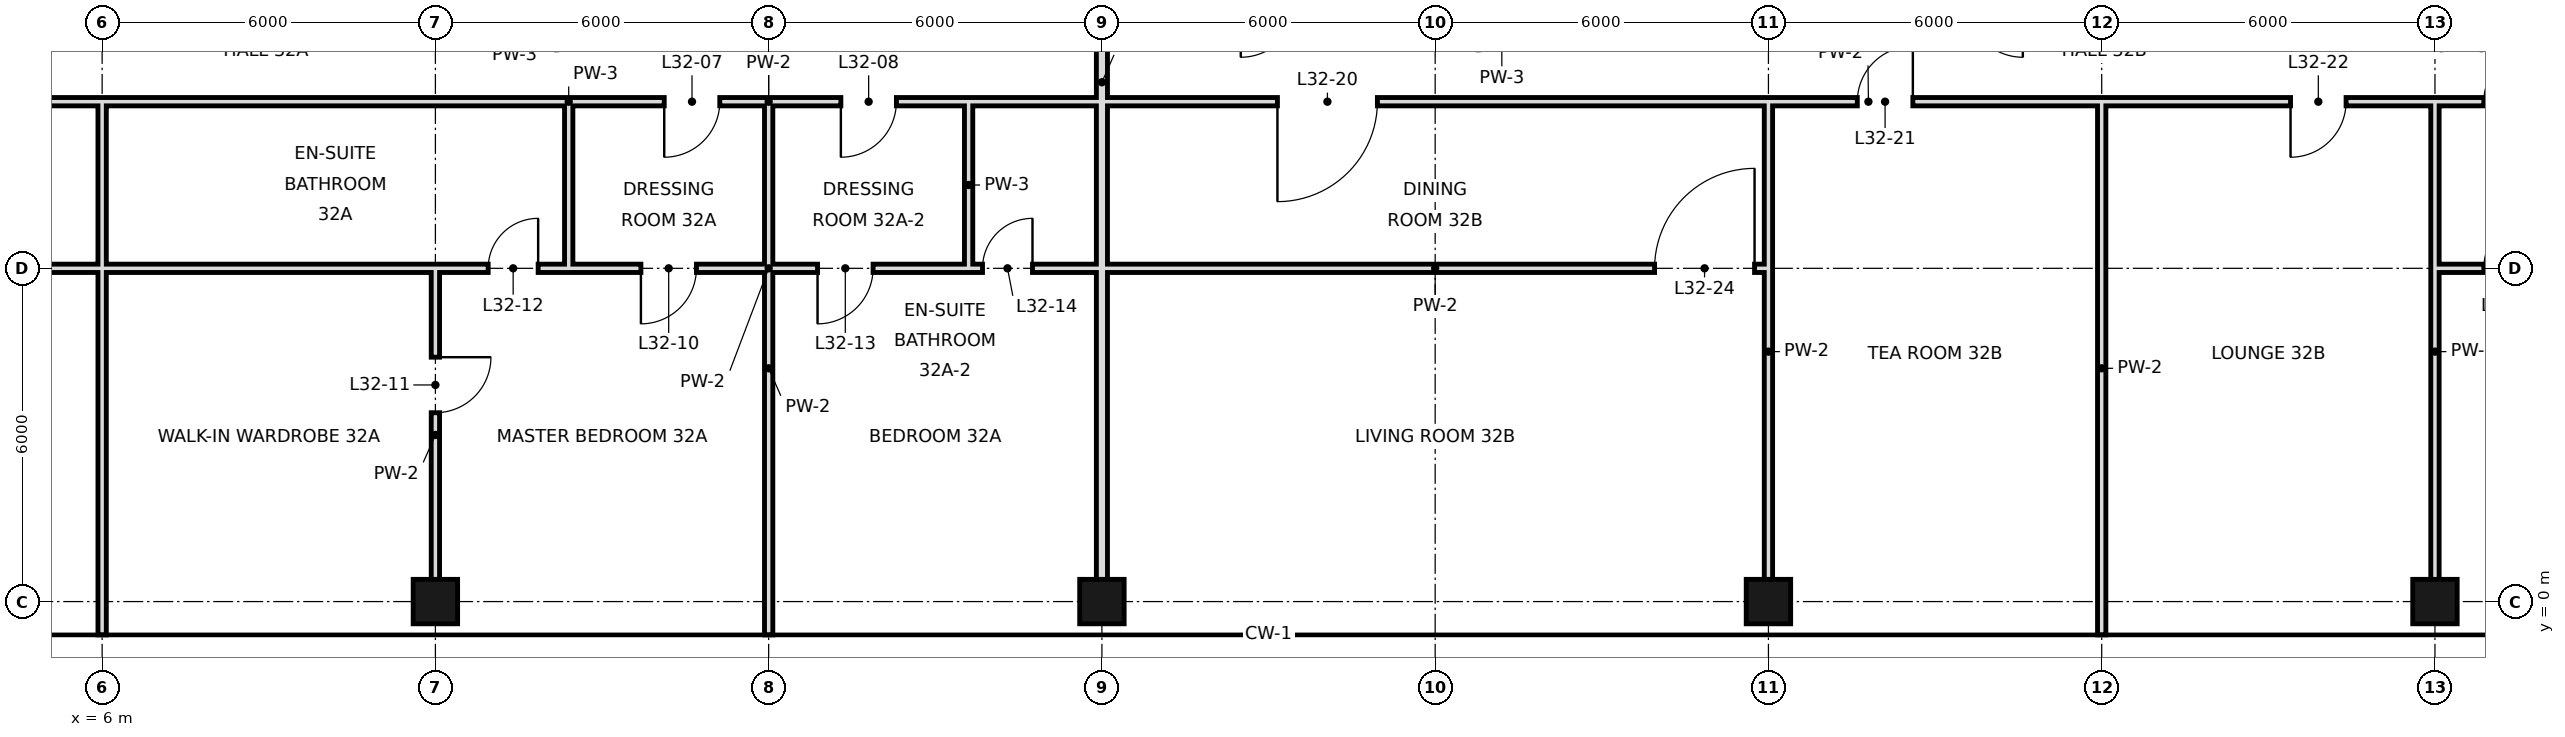
"""IFC4 building model, lengths in metres.
Left out: names, types, materials, properties, quantities, classifications, styles, units other than length and angle.
Written with IfcOpenShell. Run it as: python <this file> out.ifc"""

import sys

from ifc_helpers import new_model, si_unit, direction, frame, frame_2d, origin, origin_2d, place, context, subcontext, project, spatial, rectangle, hollow_rectangle, extrude, element, fill, save


model = new_model("IFC4")
c1 = context("Model", 3, precision=1e-05, world=origin(), true_north=direction((0.0, 1.0)))
c2 = subcontext(c1, "Body", "Model", "MODEL_VIEW")
j1 = project(units=[si_unit("LENGTHUNIT", "METRE"), si_unit("PLANEANGLEUNIT", "RADIAN")], contexts=[c1])
p1 = place(None, origin())
s1 = spatial("IfcSite", under=j1, at=p1, CompositionType="ELEMENT")
p2 = place(p1, origin())
s2 = spatial("IfcBuilding", under=s1, at=p2, CompositionType="ELEMENT")
p3 = place(p2, frame((0.0, 0.0, 143.8)))
s3 = spatial("IfcBuildingStorey", under=s2, at=p3, CompositionType="ELEMENT", Elevation=143.8)
for number, where, z_axis, x_axis in (
    (1, (12.0, 0.0, 0.0), (0.0, 0.0, 1.0), (1.0, 0.0, 0.0)),
    (2, (24.0, 0.0, 0.0), (0.0, 0.0, 1.0), (1.0, 0.0, 0.0)),
    (3, (36.0, 0.0, 0.0), (0.0, 0.0, 1.0), (1.0, 0.0, 0.0)),
    (4, (48.0, 0.0, 0.0), (0.0, 0.0, 1.0), (1.0, 0.0, 0.0)),
):
    element("IfcColumn", number, at=place(p3, frame(where, z_axis=z_axis, x_axis=x_axis)), inside=s3, PredefinedType="COLUMN", context=c2, shape_type="SweptSolid", body=[
        extrude(hollow_rectangle(XDim=0.8, YDim=0.8, WallThickness=0.04, at=origin_2d()), origin(), (0.0, 0.0, 1.0), 3.6),
    ])
p4 = place(p3, frame((12.0, 0.0, 0.0), z_axis=(0.0, 0.0, 1.0), x_axis=(0.0, 1.0, 0.0)))
e5 = element("IfcWall", 5, at=p4, inside=s3, PredefinedType="PARTITIONING", context=c2, shape_type="SweptSolid", body=[
    extrude(rectangle(XDim=6.0, YDim=0.15, at=frame_2d((3.0, 0.0))), origin(), (0.0, 0.0, 1.0), 2.72),
])
p5 = place(p4, frame((3.4, 0.0, 0.0)))
e6 = element("IfcOpeningElement", 6, at=p5, cuts=e5, PredefinedType="OPENING", context=c2, shape_type="SweptSolid", body=[
    extrude(rectangle(XDim=1.0, YDim=2.4, at=frame_2d((0.5, 1.2))), frame((0.0, 0.085, 0.0), z_axis=(0.0, -1.0, 0.0), x_axis=(1.0, 0.0, 0.0)), (0.0, 0.0, 1.0), 0.17),
])
p6 = place(p3, frame((14.4, 6.0, 0.0), z_axis=(0.0, 0.0, 1.0), x_axis=(0.0, 1.0, 0.0)))
e7 = element("IfcWall", 7, at=p6, inside=s3, PredefinedType="PARTITIONING", context=c2, shape_type="SweptSolid", body=[
    extrude(rectangle(XDim=3.0, YDim=0.15, at=frame_2d((1.5, 0.0))), origin(), (0.0, 0.0, 1.0), 3.42),
])
p7 = place(p3, frame((18.0, -0.6, 0.0), z_axis=(0.0, 0.0, 1.0), x_axis=(0.0, 1.0, 0.0)))
e8 = element("IfcWall", 8, at=p7, inside=s3, PredefinedType="PARTITIONING", context=c2, shape_type="SweptSolid", body=[
    extrude(rectangle(XDim=9.6, YDim=0.15, at=frame_2d((4.8, 0.0))), origin(), (0.0, 0.0, 1.0), 2.72),
])
p8 = place(p3, frame((21.6, 6.0, 0.0), z_axis=(0.0, 0.0, 1.0), x_axis=(0.0, 1.0, 0.0)))
e9 = element("IfcWall", 9, at=p8, inside=s3, PredefinedType="PARTITIONING", context=c2, shape_type="SweptSolid", body=[
    extrude(rectangle(XDim=3.0, YDim=0.15, at=frame_2d((1.5, 0.0))), origin(), (0.0, 0.0, 1.0), 3.42),
])
p9 = place(p3, frame((24.0, 0.0, 0.0), z_axis=(0.0, 0.0, 1.0), x_axis=(0.0, 1.0, 0.0)))
e10 = element("IfcWall", 10, at=p9, inside=s3, PredefinedType="SOLIDWALL", context=c2, shape_type="SweptSolid", body=[
    extrude(rectangle(XDim=18.7, YDim=0.2, at=frame_2d((9.35, 0.0))), origin(), (0.0, 0.0, 1.0), 2.72),
])
p10 = place(p3, frame((36.0, 0.0, 0.0), z_axis=(0.0, 0.0, 1.0), x_axis=(0.0, 1.0, 0.0)))
e11 = element("IfcWall", 11, at=p10, inside=s3, PredefinedType="PARTITIONING", context=c2, shape_type="SweptSolid", body=[
    extrude(rectangle(XDim=9.0, YDim=0.15, at=frame_2d((4.5, 0.0))), origin(), (0.0, 0.0, 1.0), 2.72),
])
p11 = place(p3, frame((42.0, -0.6, 0.0), z_axis=(0.0, 0.0, 1.0), x_axis=(0.0, 1.0, 0.0)))
e12 = element("IfcWall", 12, at=p11, inside=s3, PredefinedType="PARTITIONING", context=c2, shape_type="SweptSolid", body=[
    extrude(rectangle(XDim=9.6, YDim=0.15, at=frame_2d((4.8, 0.0))), origin(), (0.0, 0.0, 1.0), 2.72),
])
p12 = place(p3, frame((48.0, 0.0, 0.0), z_axis=(0.0, 0.0, 1.0), x_axis=(0.0, 1.0, 0.0)))
e13 = element("IfcWall", 13, at=p12, inside=s3, PredefinedType="PARTITIONING", context=c2, shape_type="SweptSolid", body=[
    extrude(rectangle(XDim=9.0, YDim=0.15, at=frame_2d((4.5, 0.0))), origin(), (0.0, 0.0, 1.0), 2.72),
])
p13 = place(p3, frame((6.0, -0.6, 0.0), z_axis=(0.0, 0.0, 1.0), x_axis=(0.0, 1.0, 0.0)))
e14 = element("IfcWall", 14, at=p13, inside=s3, PredefinedType="PARTITIONING", context=c2, shape_type="SweptSolid", body=[
    extrude(rectangle(XDim=6.6, YDim=0.15, at=frame_2d((3.3, 0.0))), origin(), (0.0, 0.0, 1.0), 2.72),
])
p14 = place(p3, frame((6.0, 6.0, 0.0), z_axis=(0.0, 0.0, 1.0), x_axis=(0.0, 1.0, 0.0)))
e15 = element("IfcWall", 15, at=p14, inside=s3, PredefinedType="PARTITIONING", context=c2, shape_type="SweptSolid", body=[
    extrude(rectangle(XDim=3.0, YDim=0.15, at=frame_2d((1.5, 0.0))), origin(), (0.0, 0.0, 1.0), 2.72),
])
p15 = place(p3, frame((-6.0, 6.0, 0.0), z_axis=(0.0, 0.0, 1.0), x_axis=(1.0, 0.0, 0.0)))
e16 = element("IfcWall", 16, at=p15, inside=s3, PredefinedType="PARTITIONING", context=c2, shape_type="SweptSolid", body=[
    extrude(rectangle(XDim=12.0, YDim=0.15, at=frame_2d((6.0, 0.0))), origin(), (0.0, 0.0, 1.0), 2.97),
])
p16 = place(p15, frame((7.04, 0.0, 0.0)))
e17 = element("IfcOpeningElement", 17, at=p16, cuts=e16, PredefinedType="OPENING", context=c2, shape_type="SweptSolid", body=[
    extrude(rectangle(XDim=1.8, YDim=2.4, at=frame_2d((0.9, 1.2))), frame((0.0, 0.085, 0.0), z_axis=(0.0, -1.0, 0.0), x_axis=(1.0, 0.0, 0.0)), (0.0, 0.0, 1.0), 0.17),
])
p17 = place(p3, frame((14.4, 6.0, 0.0), z_axis=(0.0, 0.0, 1.0), x_axis=(1.0, 0.0, 0.0)))
e18 = element("IfcWall", 18, at=p17, inside=s3, PredefinedType="PARTITIONING", context=c2, shape_type="SweptSolid", body=[
    extrude(rectangle(XDim=7.2, YDim=0.15, at=frame_2d((3.6, 0.0))), origin(), (0.0, 0.0, 1.0), 2.97),
])
p18 = place(p17, frame((1.3, 0.0, 0.0)))
e19 = element("IfcOpeningElement", 19, at=p18, cuts=e18, PredefinedType="OPENING", context=c2, shape_type="SweptSolid", body=[
    extrude(rectangle(XDim=1.0, YDim=2.4, at=frame_2d((0.5, 1.2))), frame((0.0, 0.085, 0.0), z_axis=(0.0, -1.0, 0.0), x_axis=(1.0, 0.0, 0.0)), (0.0, 0.0, 1.0), 0.17),
])
p19 = place(p17, frame((4.48, 0.0, 0.0)))
e20 = element("IfcOpeningElement", 20, at=p19, cuts=e18, PredefinedType="OPENING", context=c2, shape_type="SweptSolid", body=[
    extrude(rectangle(XDim=1.0, YDim=2.4, at=frame_2d((0.5, 1.2))), frame((0.0, 0.085, 0.0), z_axis=(0.0, -1.0, 0.0), x_axis=(1.0, 0.0, 0.0)), (0.0, 0.0, 1.0), 0.17),
])
p20 = place(p3, frame((24.0, 6.0, 0.0), z_axis=(0.0, 0.0, 1.0), x_axis=(1.0, 0.0, 0.0)))
e21 = element("IfcWall", 21, at=p20, inside=s3, PredefinedType="PARTITIONING", context=c2, shape_type="SweptSolid", body=[
    extrude(rectangle(XDim=12.0, YDim=0.15, at=frame_2d((6.0, 0.0))), origin(), (0.0, 0.0, 1.0), 2.97),
])
p21 = place(p20, frame((9.95, 0.0, 0.0)))
e22 = element("IfcOpeningElement", 22, at=p21, cuts=e21, PredefinedType="OPENING", context=c2, shape_type="SweptSolid", body=[
    extrude(rectangle(XDim=1.8, YDim=2.4, at=frame_2d((0.9, 1.2))), frame((0.0, 0.085, 0.0), z_axis=(0.0, -1.0, 0.0), x_axis=(1.0, 0.0, 0.0)), (0.0, 0.0, 1.0), 0.17),
])
p22 = place(p3, frame((48.0, 6.0, 0.0), z_axis=(0.0, 0.0, 1.0), x_axis=(1.0, 0.0, 0.0)))
e23 = element("IfcWall", 23, at=p22, inside=s3, PredefinedType="PARTITIONING", context=c2, shape_type="SweptSolid", body=[
    extrude(rectangle(XDim=3.6, YDim=0.15, at=frame_2d((1.8, 0.0))), origin(), (0.0, 0.0, 1.0), 2.72),
])
p23 = place(p22, frame((0.88, 0.0, 0.0)))
e24 = element("IfcOpeningElement", 24, at=p23, cuts=e23, PredefinedType="OPENING", context=c2, shape_type="SweptSolid", body=[
    extrude(rectangle(XDim=1.0, YDim=2.4, at=frame_2d((0.5, 1.2))), frame((0.0, 0.085, 0.0), z_axis=(0.0, -1.0, 0.0), x_axis=(1.0, 0.0, 0.0)), (0.0, 0.0, 1.0), 0.17),
])
p24 = place(p3, frame((6.0, 6.0, 0.0), z_axis=(0.0, 0.0, 1.0), x_axis=(1.0, 0.0, 0.0)))
e25 = element("IfcWall", 25, at=p24, inside=s3, PredefinedType="PARTITIONING", context=c2, shape_type="SweptSolid", body=[
    extrude(rectangle(XDim=8.4, YDim=0.15, at=frame_2d((4.2, 0.0))), origin(), (0.0, 0.0, 1.0), 2.97),
])
p25 = place(p24, frame((6.95, 0.0, 0.0)))
e26 = element("IfcOpeningElement", 26, at=p25, cuts=e25, PredefinedType="OPENING", context=c2, shape_type="SweptSolid", body=[
    extrude(rectangle(XDim=0.9, YDim=2.4, at=frame_2d((0.45, 1.2))), frame((0.0, 0.085, 0.0), z_axis=(0.0, -1.0, 0.0), x_axis=(1.0, 0.0, 0.0)), (0.0, 0.0, 1.0), 0.17),
])
p26 = place(p3, frame((21.6, 6.0, 0.0), z_axis=(0.0, 0.0, 1.0), x_axis=(1.0, 0.0, 0.0)))
e27 = element("IfcWall", 27, at=p26, inside=s3, PredefinedType="PARTITIONING", context=c2, shape_type="SweptSolid", body=[
    extrude(rectangle(XDim=2.4, YDim=0.15, at=frame_2d((1.2, 0.0))), origin(), (0.0, 0.0, 1.0), 2.97),
])
p27 = place(p26, frame((0.25, 0.0, 0.0)))
e28 = element("IfcOpeningElement", 28, at=p27, cuts=e27, PredefinedType="OPENING", context=c2, shape_type="SweptSolid", body=[
    extrude(rectangle(XDim=0.9, YDim=2.4, at=frame_2d((0.45, 1.2))), frame((0.0, 0.085, 0.0), z_axis=(0.0, -1.0, 0.0), x_axis=(1.0, 0.0, 0.0)), (0.0, 0.0, 1.0), 0.17),
])
p28 = place(p3, frame((-6.6, 9.0, 0.0), z_axis=(0.0, 0.0, 1.0), x_axis=(1.0, 0.0, 0.0)))
e29 = element("IfcWall", 29, at=p28, inside=s3, PredefinedType="PARTITIONING", context=c2, shape_type="SweptSolid", body=[
    extrude(rectangle(XDim=12.6, YDim=0.15, at=frame_2d((6.3, 0.0))), origin(), (0.0, 0.0, 1.0), 3.42),
])
p29 = place(p28, frame((7.64, 0.0, 0.0)))
e30 = element("IfcOpeningElement", 30, at=p29, cuts=e29, PredefinedType="OPENING", context=c2, shape_type="SweptSolid", body=[
    extrude(rectangle(XDim=1.8, YDim=2.4, at=frame_2d((0.9, 1.2))), frame((0.0, 0.085, 0.0), z_axis=(0.0, -1.0, 0.0), x_axis=(1.0, 0.0, 0.0)), (0.0, 0.0, 1.0), 0.17),
])
p30 = place(p3, frame((14.4, 9.0, 0.0), z_axis=(0.0, 0.0, 1.0), x_axis=(1.0, 0.0, 0.0)))
e31 = element("IfcWall", 31, at=p30, inside=s3, PredefinedType="PARTITIONING", context=c2, shape_type="SweptSolid", body=[
    extrude(rectangle(XDim=7.2, YDim=0.15, at=frame_2d((3.6, 0.0))), origin(), (0.0, 0.0, 1.0), 3.42),
])
p31 = place(p30, frame((1.72, 0.0, 0.0)))
e32 = element("IfcOpeningElement", 32, at=p31, cuts=e31, PredefinedType="OPENING", context=c2, shape_type="SweptSolid", body=[
    extrude(rectangle(XDim=1.0, YDim=2.4, at=frame_2d((0.5, 1.2))), frame((0.0, 0.085, 0.0), z_axis=(0.0, -1.0, 0.0), x_axis=(1.0, 0.0, 0.0)), (0.0, 0.0, 1.0), 0.17),
])
p32 = place(p30, frame((4.9, 0.0, 0.0)))
e33 = element("IfcOpeningElement", 33, at=p32, cuts=e31, PredefinedType="OPENING", context=c2, shape_type="SweptSolid", body=[
    extrude(rectangle(XDim=1.0, YDim=2.4, at=frame_2d((0.5, 1.2))), frame((0.0, 0.085, 0.0), z_axis=(0.0, -1.0, 0.0), x_axis=(1.0, 0.0, 0.0)), (0.0, 0.0, 1.0), 0.17),
])
p33 = place(p3, frame((24.0, 9.0, 0.0), z_axis=(0.0, 0.0, 1.0), x_axis=(1.0, 0.0, 0.0)))
e34 = element("IfcWall", 34, at=p33, inside=s3, PredefinedType="PARTITIONING", context=c2, shape_type="SweptSolid", body=[
    extrude(rectangle(XDim=27.6, YDim=0.15, at=frame_2d((13.8, 0.0))), origin(), (0.0, 0.0, 1.0), 3.42),
])
p34 = place(p33, frame((3.16, 0.0, 0.0)))
e35 = element("IfcOpeningElement", 35, at=p34, cuts=e34, PredefinedType="OPENING", context=c2, shape_type="SweptSolid", body=[
    extrude(rectangle(XDim=1.8, YDim=2.4, at=frame_2d((0.9, 1.2))), frame((0.0, 0.085, 0.0), z_axis=(0.0, -1.0, 0.0), x_axis=(1.0, 0.0, 0.0)), (0.0, 0.0, 1.0), 0.17),
])
p35 = place(p33, frame((13.6, 0.0, 0.0)))
e36 = element("IfcOpeningElement", 36, at=p35, cuts=e34, PredefinedType="OPENING", context=c2, shape_type="SweptSolid", body=[
    extrude(rectangle(XDim=1.0, YDim=2.4, at=frame_2d((0.5, 1.2))), frame((0.0, 0.085, 0.0), z_axis=(0.0, -1.0, 0.0), x_axis=(1.0, 0.0, 0.0)), (0.0, 0.0, 1.0), 0.17),
])
p36 = place(p33, frame((21.4, 0.0, 0.0)))
e37 = element("IfcOpeningElement", 37, at=p36, cuts=e34, PredefinedType="OPENING", context=c2, shape_type="SweptSolid", body=[
    extrude(rectangle(XDim=1.0, YDim=2.4, at=frame_2d((0.5, 1.2))), frame((0.0, 0.085, 0.0), z_axis=(0.0, -1.0, 0.0), x_axis=(1.0, 0.0, 0.0)), (0.0, 0.0, 1.0), 0.17),
])
p37 = place(p33, frame((24.88, 0.0, 0.0)))
e38 = element("IfcOpeningElement", 38, at=p37, cuts=e34, PredefinedType="OPENING", context=c2, shape_type="SweptSolid", body=[
    extrude(rectangle(XDim=1.0, YDim=2.4, at=frame_2d((0.5, 1.2))), frame((0.0, 0.085, 0.0), z_axis=(0.0, -1.0, 0.0), x_axis=(1.0, 0.0, 0.0)), (0.0, 0.0, 1.0), 0.17),
])
p38 = place(p3, frame((6.0, 9.0, 0.0), z_axis=(0.0, 0.0, 1.0), x_axis=(1.0, 0.0, 0.0)))
e39 = element("IfcWall", 39, at=p38, inside=s3, PredefinedType="PARTITIONING", context=c2, shape_type="SweptSolid", body=[
    extrude(rectangle(XDim=8.4, YDim=0.15, at=frame_2d((4.2, 0.0))), origin(), (0.0, 0.0, 1.0), 3.42),
])
p39 = place(p3, frame((21.6, 9.0, 0.0), z_axis=(0.0, 0.0, 1.0), x_axis=(1.0, 0.0, 0.0)))
e40 = element("IfcWall", 40, at=p39, inside=s3, PredefinedType="PARTITIONING", context=c2, shape_type="SweptSolid", body=[
    extrude(rectangle(XDim=2.4, YDim=0.15, at=frame_2d((1.2, 0.0))), origin(), (0.0, 0.0, 1.0), 3.42),
])
p40 = place(p31, frame((1.0, 0.0, 0.0), z_axis=(0.0, 0.0, 1.0), x_axis=(-1.0, 0.0, 0.0)))
e41 = element("IfcDoor", 41, at=p40, inside=s3, OperationType="SINGLE_SWING_RIGHT", PredefinedType="DOOR", context=c2, shape_type="SweptSolid", body=[
    extrude(rectangle(XDim=1.0, YDim=2.4, at=frame_2d((0.5, 1.2))), frame((0.0, 0.025, 0.0), z_axis=(0.0, -1.0, 0.0), x_axis=(1.0, 0.0, 0.0)), (0.0, 0.0, 1.0), 0.05),
])
fill(e32, e41)
p41 = place(p32, frame((1.0, 0.0, 0.0), z_axis=(0.0, 0.0, 1.0), x_axis=(-1.0, 0.0, 0.0)))
e42 = element("IfcDoor", 42, at=p41, inside=s3, OperationType="SINGLE_SWING_RIGHT", PredefinedType="DOOR", context=c2, shape_type="SweptSolid", body=[
    extrude(rectangle(XDim=1.0, YDim=2.4, at=frame_2d((0.5, 1.2))), frame((0.0, 0.025, 0.0), z_axis=(0.0, -1.0, 0.0), x_axis=(1.0, 0.0, 0.0)), (0.0, 0.0, 1.0), 0.05),
])
fill(e33, e42)
p42 = place(p18, frame((1.0, 0.0, 0.0), z_axis=(0.0, 0.0, 1.0), x_axis=(-1.0, 0.0, 0.0)))
e43 = element("IfcDoor", 43, at=p42, inside=s3, OperationType="SINGLE_SWING_RIGHT", PredefinedType="DOOR", context=c2, shape_type="SweptSolid", body=[
    extrude(rectangle(XDim=1.0, YDim=2.4, at=frame_2d((0.5, 1.2))), frame((0.0, 0.025, 0.0), z_axis=(0.0, -1.0, 0.0), x_axis=(1.0, 0.0, 0.0)), (0.0, 0.0, 1.0), 0.05),
])
fill(e19, e43)
p43 = place(p5, origin())
e44 = element("IfcDoor", 44, at=p43, inside=s3, OperationType="SINGLE_SWING_RIGHT", PredefinedType="DOOR", context=c2, shape_type="SweptSolid", body=[
    extrude(rectangle(XDim=1.0, YDim=2.4, at=frame_2d((0.5, 1.2))), frame((0.0, 0.025, 0.0), z_axis=(0.0, -1.0, 0.0), x_axis=(1.0, 0.0, 0.0)), (0.0, 0.0, 1.0), 0.05),
])
fill(e6, e44)
p44 = place(p25, frame((0.9, 0.0, 0.0), z_axis=(0.0, 0.0, 1.0), x_axis=(-1.0, 0.0, 0.0)))
e45 = element("IfcDoor", 45, at=p44, inside=s3, OperationType="SINGLE_SWING_LEFT", PredefinedType="DOOR", context=c2, shape_type="SweptSolid", body=[
    extrude(rectangle(XDim=0.9, YDim=2.4, at=frame_2d((0.45, 1.2))), frame((0.0, 0.025, 0.0), z_axis=(0.0, -1.0, 0.0), x_axis=(1.0, 0.0, 0.0)), (0.0, 0.0, 1.0), 0.05),
])
fill(e26, e45)
p45 = place(p19, frame((1.0, 0.0, 0.0), z_axis=(0.0, 0.0, 1.0), x_axis=(-1.0, 0.0, 0.0)))
e46 = element("IfcDoor", 46, at=p45, inside=s3, OperationType="SINGLE_SWING_RIGHT", PredefinedType="DOOR", context=c2, shape_type="SweptSolid", body=[
    extrude(rectangle(XDim=1.0, YDim=2.4, at=frame_2d((0.5, 1.2))), frame((0.0, 0.025, 0.0), z_axis=(0.0, -1.0, 0.0), x_axis=(1.0, 0.0, 0.0)), (0.0, 0.0, 1.0), 0.05),
])
fill(e20, e46)
p46 = place(p27, frame((0.9, 0.0, 0.0), z_axis=(0.0, 0.0, 1.0), x_axis=(-1.0, 0.0, 0.0)))
e47 = element("IfcDoor", 47, at=p46, inside=s3, OperationType="SINGLE_SWING_LEFT", PredefinedType="DOOR", context=c2, shape_type="SweptSolid", body=[
    extrude(rectangle(XDim=0.9, YDim=2.4, at=frame_2d((0.45, 1.2))), frame((0.0, 0.025, 0.0), z_axis=(0.0, -1.0, 0.0), x_axis=(1.0, 0.0, 0.0)), (0.0, 0.0, 1.0), 0.05),
])
fill(e28, e47)
p47 = place(p34, frame((1.8, 0.0, 0.0), z_axis=(0.0, 0.0, 1.0), x_axis=(-1.0, 0.0, 0.0)))
e48 = element("IfcDoor", 48, at=p47, inside=s3, OperationType="SINGLE_SWING_RIGHT", PredefinedType="DOOR", context=c2, shape_type="SweptSolid", body=[
    extrude(rectangle(XDim=1.8, YDim=2.4, at=frame_2d((0.9, 1.2))), frame((0.0, 0.025, 0.0), z_axis=(0.0, -1.0, 0.0), x_axis=(1.0, 0.0, 0.0)), (0.0, 0.0, 1.0), 0.05),
])
fill(e35, e48)
p48 = place(p35, frame((1.0, 0.0, 0.0), z_axis=(0.0, 0.0, 1.0), x_axis=(-1.0, 0.0, 0.0)))
e49 = element("IfcDoor", 49, at=p48, inside=s3, OperationType="SINGLE_SWING_LEFT", PredefinedType="DOOR", context=c2, shape_type="SweptSolid", body=[
    extrude(rectangle(XDim=1.0, YDim=2.4, at=frame_2d((0.5, 1.2))), frame((0.0, 0.025, 0.0), z_axis=(0.0, -1.0, 0.0), x_axis=(1.0, 0.0, 0.0)), (0.0, 0.0, 1.0), 0.05),
])
fill(e36, e49)
p49 = place(p36, frame((1.0, 0.0, 0.0), z_axis=(0.0, 0.0, 1.0), x_axis=(-1.0, 0.0, 0.0)))
e50 = element("IfcDoor", 50, at=p49, inside=s3, OperationType="SINGLE_SWING_RIGHT", PredefinedType="DOOR", context=c2, shape_type="SweptSolid", body=[
    extrude(rectangle(XDim=1.0, YDim=2.4, at=frame_2d((0.5, 1.2))), frame((0.0, 0.025, 0.0), z_axis=(0.0, -1.0, 0.0), x_axis=(1.0, 0.0, 0.0)), (0.0, 0.0, 1.0), 0.05),
])
fill(e37, e50)
p50 = place(p37, frame((1.0, 0.0, 0.0), z_axis=(0.0, 0.0, 1.0), x_axis=(-1.0, 0.0, 0.0)))
e51 = element("IfcDoor", 51, at=p50, inside=s3, OperationType="SINGLE_SWING_LEFT", PredefinedType="DOOR", context=c2, shape_type="SweptSolid", body=[
    extrude(rectangle(XDim=1.0, YDim=2.4, at=frame_2d((0.5, 1.2))), frame((0.0, 0.025, 0.0), z_axis=(0.0, -1.0, 0.0), x_axis=(1.0, 0.0, 0.0)), (0.0, 0.0, 1.0), 0.05),
])
fill(e38, e51)
p51 = place(p21, frame((1.8, 0.0, 0.0), z_axis=(0.0, 0.0, 1.0), x_axis=(-1.0, 0.0, 0.0)))
e52 = element("IfcDoor", 52, at=p51, inside=s3, OperationType="SINGLE_SWING_LEFT", PredefinedType="DOOR", context=c2, shape_type="SweptSolid", body=[
    extrude(rectangle(XDim=1.8, YDim=2.4, at=frame_2d((0.9, 1.2))), frame((0.0, 0.025, 0.0), z_axis=(0.0, -1.0, 0.0), x_axis=(1.0, 0.0, 0.0)), (0.0, 0.0, 1.0), 0.05),
])
fill(e22, e52)
p52 = place(p23, frame((1.0, 0.0, 0.0), z_axis=(0.0, 0.0, 1.0), x_axis=(-1.0, 0.0, 0.0)))
e53 = element("IfcDoor", 53, at=p52, inside=s3, OperationType="SINGLE_SWING_LEFT", PredefinedType="DOOR", context=c2, shape_type="SweptSolid", body=[
    extrude(rectangle(XDim=1.0, YDim=2.4, at=frame_2d((0.5, 1.2))), frame((0.0, 0.025, 0.0), z_axis=(0.0, -1.0, 0.0), x_axis=(1.0, 0.0, 0.0)), (0.0, 0.0, 1.0), 0.05),
])
fill(e24, e53)
save(model, sys.argv[1])
